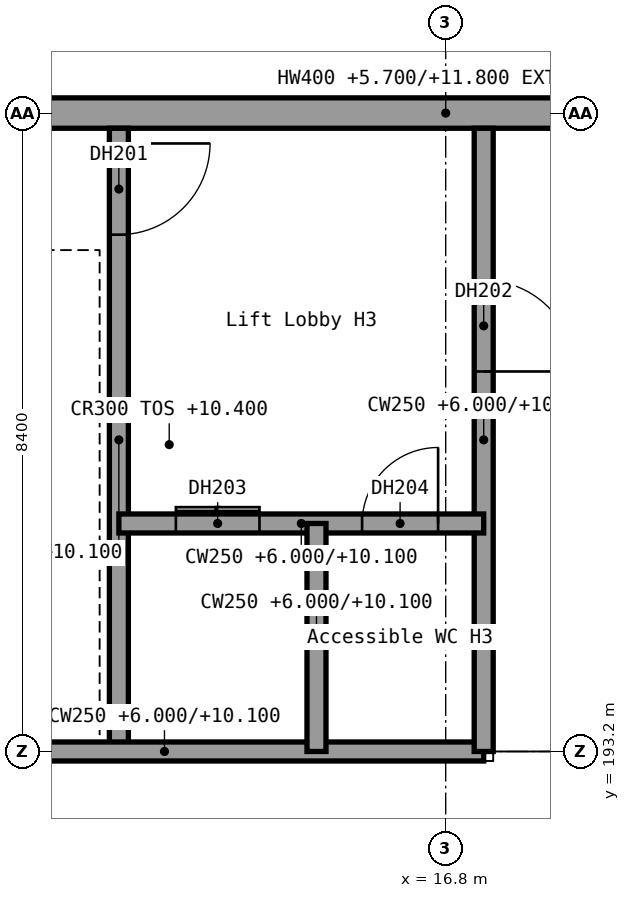
"""IFC4 building model, lengths in metres.
Left out: names, types, materials, properties, quantities, classifications, styles, units other than length and angle.
Written with IfcOpenShell. Run it as: python <this file> out.ifc"""

import sys

from ifc_helpers import new_model, si_unit, direction, frame, frame_2d, origin, place, context, subcontext, project, spatial, rectangle, extrude, element, fill, save


model = new_model("IFC4")
c1 = context("Model", 3, precision=1e-05, world=origin(), true_north=direction((0.0, 1.0)))
c2 = subcontext(c1, "Body", "Model", "MODEL_VIEW")
j1 = project(units=[si_unit("LENGTHUNIT", "METRE"), si_unit("PLANEANGLEUNIT", "RADIAN")], contexts=[c1])
p1 = place(None, origin())
s1 = spatial("IfcSite", under=j1, at=p1, CompositionType="ELEMENT")
p2 = place(p1, origin())
s2 = spatial("IfcBuilding", under=s1, at=p2, CompositionType="ELEMENT")
p3 = place(p2, frame((0.0, 0.0, 6.0)))
s3 = spatial("IfcBuildingStorey", under=s2, at=p3, CompositionType="ELEMENT", Elevation=6.0)
p4 = place(p3, frame((8.9, 201.6, -0.3), z_axis=(0.0, 0.0, 1.0), x_axis=(1.0, 0.0, 0.0)))
e1 = element("IfcWall", 1, at=p4, inside=s3, PredefinedType="STANDARD", context=c2, shape_type="SweptSolid", body=[
    extrude(rectangle(XDim=15.8, YDim=0.4, at=frame_2d((7.9, 0.0))), origin(), (0.0, 0.0, 1.0), 6.1),
])
p5 = place(p3, frame((12.5, 201.4, 0.0), z_axis=(0.0, 0.0, 1.0), x_axis=(0.0, -1.0, 0.0)))
e2 = element("IfcWall", 2, at=p5, inside=s3, PredefinedType="SHEAR", context=c2, shape_type="SweptSolid", body=[
    extrude(rectangle(XDim=8.2, YDim=0.25, at=frame_2d((4.1, 0.0))), origin(), (0.0, 0.0, 1.0), 4.1),
])
p6 = place(p5, frame((0.2, 0.0, 0.0)))
e3 = element("IfcOpeningElement", 3, at=p6, cuts=e2, PredefinedType="OPENING", context=c2, shape_type="SweptSolid", body=[
    extrude(rectangle(XDim=1.2, YDim=2.1, at=frame_2d((0.6, 1.05))), frame((0.0, 0.125, 0.0), z_axis=(0.0, -1.0, 0.0), x_axis=(1.0, 0.0, 0.0)), (0.0, 0.0, 1.0), 0.25),
])
p7 = place(p3, frame((8.9, 193.2, 0.0), z_axis=(0.0, 0.0, 1.0), x_axis=(1.0, 0.0, 0.0)))
e4 = element("IfcWall", 4, at=p7, inside=s3, PredefinedType="SHEAR", context=c2, shape_type="SweptSolid", body=[
    extrude(rectangle(XDim=8.4, YDim=0.25, at=frame_2d((4.2, 0.0))), origin(), (0.0, 0.0, 1.0), 4.1),
])
p8 = place(p3, frame((17.3, 201.4, 0.0), z_axis=(0.0, 0.0, 1.0), x_axis=(0.0, -1.0, 0.0)))
e5 = element("IfcWall", 5, at=p8, inside=s3, PredefinedType="SHEAR", context=c2, shape_type="SweptSolid", body=[
    extrude(rectangle(XDim=8.2, YDim=0.25, at=frame_2d((4.1, 0.0))), origin(), (0.0, 0.0, 1.0), 4.1),
])
p9 = place(p8, frame((2.0, 0.0, 0.0)))
e6 = element("IfcOpeningElement", 6, at=p9, cuts=e5, PredefinedType="OPENING", context=c2, shape_type="SweptSolid", body=[
    extrude(rectangle(XDim=1.2, YDim=2.1, at=frame_2d((0.6, 1.05))), frame((0.0, 0.125, 0.0), z_axis=(0.0, -1.0, 0.0), x_axis=(1.0, 0.0, 0.0)), (0.0, 0.0, 1.0), 0.25),
])
p10 = place(p3, frame((12.5, 196.2, 0.0), z_axis=(0.0, 0.0, 1.0), x_axis=(1.0, 0.0, 0.0)))
e7 = element("IfcWall", 7, at=p10, inside=s3, PredefinedType="SHEAR", context=c2, shape_type="SweptSolid", body=[
    extrude(rectangle(XDim=4.8, YDim=0.25, at=frame_2d((2.4, 0.0))), origin(), (0.0, 0.0, 1.0), 4.1),
])
p11 = place(p10, frame((0.75, 0.0, 0.0)))
e8 = element("IfcOpeningElement", 8, at=p11, cuts=e7, PredefinedType="OPENING", context=c2, shape_type="SweptSolid", body=[
    extrude(rectangle(XDim=1.1, YDim=2.1, at=frame_2d((0.55, 1.05))), frame((0.0, 0.125, 0.0), z_axis=(0.0, -1.0, 0.0), x_axis=(1.0, 0.0, 0.0)), (0.0, 0.0, 1.0), 0.25),
])
p12 = place(p10, frame((3.2, 0.0, 0.0)))
e9 = element("IfcOpeningElement", 9, at=p12, cuts=e7, PredefinedType="OPENING", context=c2, shape_type="SweptSolid", body=[
    extrude(rectangle(XDim=1.0, YDim=2.1, at=frame_2d((0.5, 1.05))), frame((0.0, 0.125, 0.0), z_axis=(0.0, -1.0, 0.0), x_axis=(1.0, 0.0, 0.0)), (0.0, 0.0, 1.0), 0.25),
])
p13 = place(p3, frame((15.1, 196.2, 0.0), z_axis=(0.0, 0.0, 1.0), x_axis=(0.0, -1.0, 0.0)))
e10 = element("IfcWall", 10, at=p13, inside=s3, PredefinedType="SHEAR", context=c2, shape_type="SweptSolid", body=[
    extrude(rectangle(XDim=3.0, YDim=0.25, at=frame_2d((1.5, 0.0))), origin(), (0.0, 0.0, 1.0), 4.1),
])
p14 = place(p6, origin())
e11 = element("IfcDoor", 11, at=p14, inside=s3, OperationType="SINGLE_SWING_LEFT", PredefinedType="DOOR", context=c2, shape_type="SweptSolid", body=[
    extrude(rectangle(XDim=1.2, YDim=2.1, at=frame_2d((0.6, 1.05))), frame((0.0, 0.025, 0.0), z_axis=(0.0, -1.0, 0.0), x_axis=(1.0, 0.0, 0.0)), (0.0, 0.0, 1.0), 0.05),
])
fill(e3, e11)
p15 = place(p9, origin())
e12 = element("IfcDoor", 12, at=p15, inside=s3, OperationType="SINGLE_SWING_LEFT", PredefinedType="DOOR", context=c2, shape_type="SweptSolid", body=[
    extrude(rectangle(XDim=1.2, YDim=2.1, at=frame_2d((0.6, 1.05))), frame((0.0, 0.025, 0.0), z_axis=(0.0, -1.0, 0.0), x_axis=(1.0, 0.0, 0.0)), (0.0, 0.0, 1.0), 0.05),
])
fill(e6, e12)
p16 = place(p11, origin())
e13 = element("IfcDoor", 13, at=p16, inside=s3, OperationType="DOUBLE_DOOR_SLIDING", PredefinedType="DOOR", context=c2, shape_type="SweptSolid", body=[
    extrude(rectangle(XDim=1.1, YDim=2.1, at=frame_2d((0.55, 1.05))), frame((0.0, 0.025, 0.0), z_axis=(0.0, -1.0, 0.0), x_axis=(1.0, 0.0, 0.0)), (0.0, 0.0, 1.0), 0.05),
])
fill(e8, e13)
p17 = place(p12, origin())
e14 = element("IfcDoor", 14, at=p17, inside=s3, OperationType="SINGLE_SWING_RIGHT", PredefinedType="DOOR", context=c2, shape_type="SweptSolid", body=[
    extrude(rectangle(XDim=1.0, YDim=2.1, at=frame_2d((0.5, 1.05))), frame((0.0, 0.025, 0.0), z_axis=(0.0, -1.0, 0.0), x_axis=(1.0, 0.0, 0.0)), (0.0, 0.0, 1.0), 0.05),
])
fill(e9, e14)
save(model, sys.argv[1])
